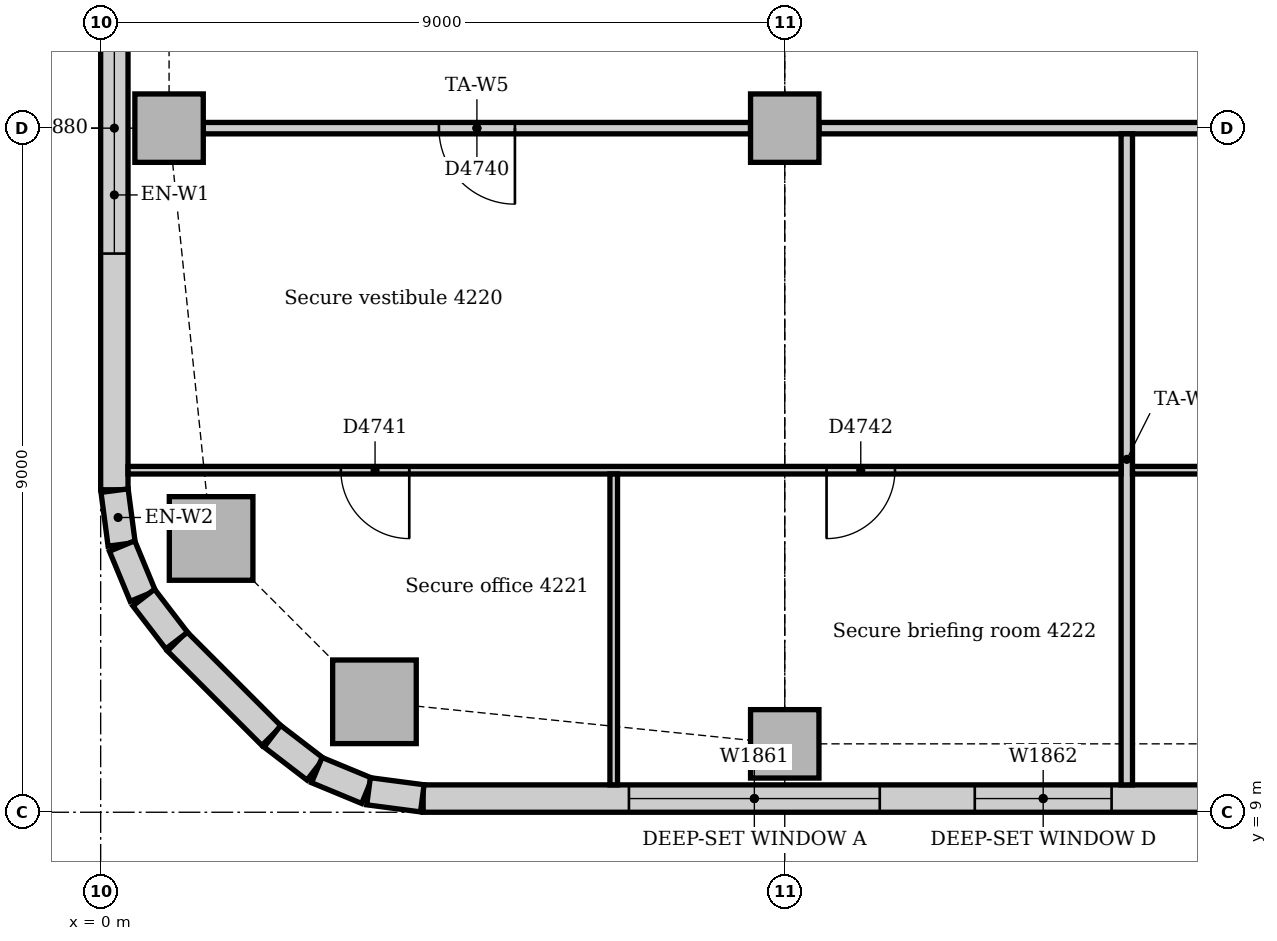
"""IFC4 building model, lengths in metres.
Left out: names, types, materials, properties, quantities, classifications, styles, units other than length and angle.
Written with IfcOpenShell. Run it as: python <this file> out.ifc"""

import sys

from ifc_helpers import new_model, si_unit, direction, frame, frame_2d, origin, origin_2d, place, context, subcontext, project, spatial, rectangle, extrude, element, fill, save


model = new_model("IFC4")
c1 = context("Model", 3, precision=1e-05, world=origin(), true_north=direction((0.0, 1.0)))
c2 = subcontext(c1, "Body", "Model", "MODEL_VIEW")
j1 = project(units=[si_unit("LENGTHUNIT", "METRE"), si_unit("PLANEANGLEUNIT", "RADIAN")], contexts=[c1])
p1 = place(None, origin())
s1 = spatial("IfcSite", under=j1, at=p1, CompositionType="ELEMENT")
p2 = place(p1, origin())
s2 = spatial("IfcBuilding", under=s1, at=p2, CompositionType="ELEMENT")
p3 = place(p2, frame((0.0, 0.0, 177.0)))
s3 = spatial("IfcBuildingStorey", under=s2, at=p3, CompositionType="ELEMENT", Elevation=177.0)
for number, where, z_axis, x_axis in (
    (1, (3.602, 10.453, 0.0), (0.0, 0.0, 1.0), (1.0, 0.0, 0.0)),
    (2, (1.453, 12.602, 0.0), (0.0, 0.0, 1.0), (1.0, 0.0, 0.0)),
):
    element("IfcColumn", number, at=place(p3, frame(where, z_axis=z_axis, x_axis=x_axis)), inside=s3, PredefinedType="COLUMN", context=c2, shape_type="SweptSolid", body=[
        extrude(rectangle(XDim=1.1, YDim=1.1, at=origin_2d()), origin(), (0.0, 0.0, 1.0), 3.85),
    ])
for number, where, z_axis, x_axis in (
    (3, (9.0, 9.9, 0.0), (0.0, 0.0, 1.0), (1.0, 0.0, 0.0)),
    (4, (0.9, 18.0, 0.0), (0.0, 0.0, 1.0), (1.0, 0.0, 0.0)),
    (5, (9.0, 18.0, 0.0), (0.0, 0.0, 1.0), (1.0, 0.0, 0.0)),
):
    element("IfcColumn", number, at=place(p3, frame(where, z_axis=z_axis, x_axis=x_axis)), inside=s3, PredefinedType="COLUMN", context=c2, shape_type="SweptSolid", body=[
        extrude(rectangle(XDim=0.9, YDim=0.9, at=origin_2d()), origin(), (0.0, 0.0, 1.0), 3.85),
    ])
p4 = place(p3, frame((4.243, 9.18, 0.0), z_axis=(0.0, 0.0, 1.0), x_axis=(1.0, 0.0, 0.0)))
e6 = element("IfcWall", 6, at=p4, inside=s3, PredefinedType="STANDARD", context=c2, shape_type="SweptSolid", body=[
    extrude(rectangle(XDim=30.515, YDim=0.36, at=frame_2d((15.257, 0.0))), origin(), (0.0, 0.0, 1.0), 3.85),
])
p5 = place(p4, frame((2.707, 0.0, 0.9)))
e7 = element("IfcOpeningElement", 7, at=p5, cuts=e6, PredefinedType="OPENING", context=c2, shape_type="SweptSolid", body=[
    extrude(rectangle(XDim=3.3, YDim=1.6, at=frame_2d((1.65, 0.8))), frame((0.0, 0.19, 0.0), z_axis=(0.0, -1.0, 0.0), x_axis=(1.0, 0.0, 0.0)), (0.0, 0.0, 1.0), 0.38),
])
p6 = place(p4, frame((7.257, 0.0, 0.9)))
e8 = element("IfcOpeningElement", 8, at=p6, cuts=e6, PredefinedType="OPENING", context=c2, shape_type="SweptSolid", body=[
    extrude(rectangle(XDim=1.8, YDim=1.6, at=frame_2d((0.9, 0.8))), frame((0.0, 0.19, 0.0), z_axis=(0.0, -1.0, 0.0), x_axis=(1.0, 0.0, 0.0)), (0.0, 0.0, 1.0), 0.38),
])
p7 = place(p4, frame((11.357, 0.0, 0.9)))
e9 = element("IfcOpeningElement", 9, at=p7, cuts=e6, PredefinedType="OPENING", context=c2, shape_type="SweptSolid", body=[
    extrude(rectangle(XDim=3.3, YDim=1.6, at=frame_2d((1.65, 0.8))), frame((0.0, 0.19, 0.0), z_axis=(0.0, -1.0, 0.0), x_axis=(1.0, 0.0, 0.0)), (0.0, 0.0, 1.0), 0.38),
])
p8 = place(p4, frame((16.207, 0.0, 0.9)))
e10 = element("IfcOpeningElement", 10, at=p8, cuts=e6, PredefinedType="OPENING", context=c2, shape_type="SweptSolid", body=[
    extrude(rectangle(XDim=3.3, YDim=1.6, at=frame_2d((1.65, 0.8))), frame((0.0, 0.19, 0.0), z_axis=(0.0, -1.0, 0.0), x_axis=(1.0, 0.0, 0.0)), (0.0, 0.0, 1.0), 0.38),
])
p9 = place(p4, frame((20.357, 0.0, 0.9)))
e11 = element("IfcOpeningElement", 11, at=p9, cuts=e6, PredefinedType="OPENING", context=c2, shape_type="SweptSolid", body=[
    extrude(rectangle(XDim=3.3, YDim=1.6, at=frame_2d((1.65, 0.8))), frame((0.0, 0.19, 0.0), z_axis=(0.0, -1.0, 0.0), x_axis=(1.0, 0.0, 0.0)), (0.0, 0.0, 1.0), 0.38),
])
p10 = place(p4, frame((24.857, 0.0, 0.9)))
e12 = element("IfcOpeningElement", 12, at=p10, cuts=e6, PredefinedType="OPENING", context=c2, shape_type="SweptSolid", body=[
    extrude(rectangle(XDim=3.3, YDim=1.6, at=frame_2d((1.65, 0.8))), frame((0.0, 0.19, 0.0), z_axis=(0.0, -1.0, 0.0), x_axis=(1.0, 0.0, 0.0)), (0.0, 0.0, 1.0), 0.38),
])
p11 = place(p3, frame((0.18, 21.0, 0.0), z_axis=(0.0, 0.0, 1.0), x_axis=(0.0, -1.0, 0.0)))
e13 = element("IfcWall", 13, at=p11, inside=s3, PredefinedType="STANDARD", context=c2, shape_type="SweptSolid", body=[
    extrude(rectangle(XDim=7.757, YDim=0.36, at=frame_2d((3.879, 0.0))), origin(), (0.0, 0.0, 1.0), 3.85),
])
p12 = place(p11, frame((1.35, 0.0, 0.9)))
e14 = element("IfcOpeningElement", 14, at=p12, cuts=e13, PredefinedType="OPENING", context=c2, shape_type="SweptSolid", body=[
    extrude(rectangle(XDim=3.3, YDim=1.6, at=frame_2d((1.65, 0.8))), frame((0.0, 0.19, 0.0), z_axis=(0.0, -1.0, 0.0), x_axis=(1.0, 0.0, 0.0)), (0.0, 0.0, 1.0), 0.38),
])
p13 = place(p3, frame((1.006, 11.249, 0.0), z_axis=(0.0, 0.0, 1.0), x_axis=(0.707106781187, -0.707106781187, 0.0)))
e15 = element("IfcWall", 15, at=p13, inside=s3, PredefinedType="STANDARD", context=c2, shape_type="SweptSolid", body=[
    extrude(rectangle(XDim=1.757, YDim=0.36, at=frame_2d((0.879, 0.0))), origin(), (0.0, 0.0, 1.0), 3.85),
])
for number, where, z_axis, x_axis in (
    (16, (0.183, 13.231, 0.0), (0.0, 0.0, 1.0), (0.131, -0.991, 0.0)),
    (17, (0.282, 12.503, 0.0), (0.0, 0.0, 1.0), (0.383, -0.924, 0.0)),
):
    element("IfcWall", number, at=place(p3, frame(where, z_axis=z_axis, x_axis=x_axis)), inside=s3, PredefinedType="STANDARD", context=c2, shape_type="SweptSolid", body=[
        extrude(rectangle(XDim=0.713, YDim=0.36, at=frame_2d((0.356, 0.0))), origin(), (0.0, 0.0, 1.0), 3.85),
    ])
for number, where, z_axis, x_axis in (
    (18, (0.566, 11.825, 0.0), (0.0, 0.0, 1.0), (0.609, -0.793, 0.0)),
    (19, (2.259, 10.0, 0.0), (0.0, 0.0, 1.0), (0.793, -0.609, 0.0)),
):
    element("IfcWall", number, at=place(p3, frame(where, z_axis=z_axis, x_axis=x_axis)), inside=s3, PredefinedType="STANDARD", context=c2, shape_type="SweptSolid", body=[
        extrude(rectangle(XDim=0.713, YDim=0.36, at=frame_2d((0.357, 0.0))), origin(), (0.0, 0.0, 1.0), 3.85),
    ])
for number, where, z_axis, x_axis in (
    (20, (2.844, 9.555, 0.0), (0.0, 0.0, 1.0), (0.924, -0.383, 0.0)),
    (21, (3.524, 9.276, 0.0), (0.0, 0.0, 1.0), (0.991, -0.131, 0.0)),
):
    element("IfcWall", number, at=place(p3, frame(where, z_axis=z_axis, x_axis=x_axis)), inside=s3, PredefinedType="STANDARD", context=c2, shape_type="SweptSolid", body=[
        extrude(rectangle(XDim=0.713, YDim=0.36, at=frame_2d((0.356, 0.0))), origin(), (0.0, 0.0, 1.0), 3.85),
    ])
p14 = place(p3, frame((1.35, 18.0, 0.0), z_axis=(0.0, 0.0, 1.0), x_axis=(1.0, 0.0, 0.0)))
e22 = element("IfcWall", 22, at=p14, inside=s3, PredefinedType="PARTITIONING", context=c2, shape_type="SweptSolid", body=[
    extrude(rectangle(XDim=7.2, YDim=0.15, at=frame_2d((3.6, 0.0))), origin(), (0.0, 0.0, 1.0), 3.262),
])
p15 = place(p14, frame((3.1, 0.0, 0.0)))
e23 = element("IfcOpeningElement", 23, at=p15, cuts=e22, PredefinedType="OPENING", context=c2, shape_type="SweptSolid", body=[
    extrude(rectangle(XDim=1.0, YDim=2.1, at=frame_2d((0.5, 1.05))), frame((0.0, 0.085, 0.0), z_axis=(0.0, -1.0, 0.0), x_axis=(1.0, 0.0, 0.0)), (0.0, 0.0, 1.0), 0.17),
])
p16 = place(p3, frame((9.45, 18.0, 0.0), z_axis=(0.0, 0.0, 1.0), x_axis=(1.0, 0.0, 0.0)))
e24 = element("IfcWall", 24, at=p16, inside=s3, PredefinedType="PARTITIONING", context=c2, shape_type="SweptSolid", body=[
    extrude(rectangle(XDim=8.1, YDim=0.15, at=frame_2d((4.05, 0.0))), origin(), (0.0, 0.0, 1.0), 3.262),
])
p17 = place(p16, frame((5.5, 0.0, 0.0)))
e25 = element("IfcOpeningElement", 25, at=p17, cuts=e24, PredefinedType="OPENING", context=c2, shape_type="SweptSolid", body=[
    extrude(rectangle(XDim=1.0, YDim=2.1, at=frame_2d((0.5, 1.05))), frame((0.0, 0.085, 0.0), z_axis=(0.0, -1.0, 0.0), x_axis=(1.0, 0.0, 0.0)), (0.0, 0.0, 1.0), 0.17),
])
p18 = place(p3, frame((13.5, 9.36, 0.0), z_axis=(0.0, 0.0, 1.0), x_axis=(0.0, 1.0, 0.0)))
e26 = element("IfcWall", 26, at=p18, inside=s3, PredefinedType="PARTITIONING", context=c2, shape_type="SweptSolid", body=[
    extrude(rectangle(XDim=8.565, YDim=0.15, at=frame_2d((4.282, 0.0))), origin(), (0.0, 0.0, 1.0), 3.85),
])
p19 = place(p3, frame((13.575, 13.5, 0.0), z_axis=(0.0, 0.0, 1.0), x_axis=(1.0, 0.0, 0.0)))
e27 = element("IfcWall", 27, at=p19, inside=s3, PredefinedType="PARTITIONING", context=c2, shape_type="SweptSolid", body=[
    extrude(rectangle(XDim=13.35, YDim=0.1, at=frame_2d((6.675, 0.0))), origin(), (0.0, 0.0, 1.0), 3.4),
])
p20 = place(p19, frame((2.95, 0.0, 0.0)))
e28 = element("IfcOpeningElement", 28, at=p20, cuts=e27, PredefinedType="OPENING", context=c2, shape_type="SweptSolid", body=[
    extrude(rectangle(XDim=0.9, YDim=2.1, at=frame_2d((0.45, 1.05))), frame((0.0, 0.06, 0.0), z_axis=(0.0, -1.0, 0.0), x_axis=(1.0, 0.0, 0.0)), (0.0, 0.0, 1.0), 0.12),
])
p21 = place(p19, frame((9.475, 0.0, 0.0)))
e29 = element("IfcOpeningElement", 29, at=p21, cuts=e27, PredefinedType="OPENING", context=c2, shape_type="SweptSolid", body=[
    extrude(rectangle(XDim=0.9, YDim=2.1, at=frame_2d((0.45, 1.05))), frame((0.0, 0.06, 0.0), z_axis=(0.0, -1.0, 0.0), x_axis=(1.0, 0.0, 0.0)), (0.0, 0.0, 1.0), 0.12),
])
p22 = place(p3, frame((0.36, 13.5, 0.0), z_axis=(0.0, 0.0, 1.0), x_axis=(1.0, 0.0, 0.0)))
e30 = element("IfcWall", 30, at=p22, inside=s3, PredefinedType="PARTITIONING", context=c2, shape_type="SweptSolid", body=[
    extrude(rectangle(XDim=13.065, YDim=0.1, at=frame_2d((6.532, 0.0))), origin(), (0.0, 0.0, 1.0), 3.4),
])
p23 = place(p22, frame((2.8, 0.0, 0.0)))
e31 = element("IfcOpeningElement", 31, at=p23, cuts=e30, PredefinedType="OPENING", context=c2, shape_type="SweptSolid", body=[
    extrude(rectangle(XDim=0.9, YDim=2.1, at=frame_2d((0.45, 1.05))), frame((0.0, 0.06, 0.0), z_axis=(0.0, -1.0, 0.0), x_axis=(1.0, 0.0, 0.0)), (0.0, 0.0, 1.0), 0.12),
])
p24 = place(p22, frame((9.19, 0.0, 0.0)))
e32 = element("IfcOpeningElement", 32, at=p24, cuts=e30, PredefinedType="OPENING", context=c2, shape_type="SweptSolid", body=[
    extrude(rectangle(XDim=0.9, YDim=2.1, at=frame_2d((0.45, 1.05))), frame((0.0, 0.06, 0.0), z_axis=(0.0, -1.0, 0.0), x_axis=(1.0, 0.0, 0.0)), (0.0, 0.0, 1.0), 0.12),
])
p25 = place(p3, frame((6.75, 9.36, 0.0), z_axis=(0.0, 0.0, 1.0), x_axis=(0.0, 1.0, 0.0)))
e33 = element("IfcWall", 33, at=p25, inside=s3, PredefinedType="PARTITIONING", context=c2, shape_type="SweptSolid", body=[
    extrude(rectangle(XDim=4.09, YDim=0.1, at=frame_2d((2.045, 0.0))), origin(), (0.0, 0.0, 1.0), 3.85),
])
p26 = place(p5, origin())
e34 = element("IfcWindow", 34, at=p26, inside=s3, PartitioningType="SINGLE_PANEL", PredefinedType="WINDOW", context=c2, shape_type="SweptSolid", body=[
    extrude(rectangle(XDim=3.3, YDim=1.6, at=frame_2d((1.65, 0.8))), frame((0.0, 0.13, 0.0), z_axis=(0.0, -1.0, 0.0), x_axis=(1.0, 0.0, 0.0)), (0.0, 0.0, 1.0), 0.06),
])
fill(e7, e34)
p27 = place(p6, origin())
e35 = element("IfcWindow", 35, at=p27, inside=s3, PartitioningType="SINGLE_PANEL", PredefinedType="WINDOW", context=c2, shape_type="SweptSolid", body=[
    extrude(rectangle(XDim=1.8, YDim=1.6, at=frame_2d((0.9, 0.8))), frame((0.0, 0.13, 0.0), z_axis=(0.0, -1.0, 0.0), x_axis=(1.0, 0.0, 0.0)), (0.0, 0.0, 1.0), 0.06),
])
fill(e8, e35)
p28 = place(p12, origin())
e36 = element("IfcWindow", 36, at=p28, inside=s3, PartitioningType="SINGLE_PANEL", PredefinedType="WINDOW", context=c2, shape_type="SweptSolid", body=[
    extrude(rectangle(XDim=3.3, YDim=1.6, at=frame_2d((1.65, 0.8))), frame((0.0, 0.13, 0.0), z_axis=(0.0, -1.0, 0.0), x_axis=(1.0, 0.0, 0.0)), (0.0, 0.0, 1.0), 0.06),
])
fill(e14, e36)
p29 = place(p15, frame((1.0, 0.0, 0.0), z_axis=(0.0, 0.0, 1.0), x_axis=(-1.0, 0.0, 0.0)))
e37 = element("IfcDoor", 37, at=p29, inside=s3, OperationType="SINGLE_SWING_LEFT", PredefinedType="DOOR", context=c2, shape_type="SweptSolid", body=[
    extrude(rectangle(XDim=1.0, YDim=2.1, at=frame_2d((0.5, 1.05))), frame((0.0, 0.025, 0.0), z_axis=(0.0, -1.0, 0.0), x_axis=(1.0, 0.0, 0.0)), (0.0, 0.0, 1.0), 0.05),
])
fill(e23, e37)
p30 = place(p23, frame((0.9, 0.0, 0.0), z_axis=(0.0, 0.0, 1.0), x_axis=(-1.0, 0.0, 0.0)))
e38 = element("IfcDoor", 38, at=p30, inside=s3, OperationType="SINGLE_SWING_LEFT", PredefinedType="DOOR", context=c2, shape_type="SweptSolid", body=[
    extrude(rectangle(XDim=0.9, YDim=2.1, at=frame_2d((0.45, 1.05))), frame((0.0, 0.025, 0.0), z_axis=(0.0, -1.0, 0.0), x_axis=(1.0, 0.0, 0.0)), (0.0, 0.0, 1.0), 0.05),
])
fill(e31, e38)
p31 = place(p24, frame((0.9, 0.0, 0.0), z_axis=(0.0, 0.0, 1.0), x_axis=(-1.0, 0.0, 0.0)))
e39 = element("IfcDoor", 39, at=p31, inside=s3, OperationType="SINGLE_SWING_RIGHT", PredefinedType="DOOR", context=c2, shape_type="SweptSolid", body=[
    extrude(rectangle(XDim=0.9, YDim=2.1, at=frame_2d((0.45, 1.05))), frame((0.0, 0.025, 0.0), z_axis=(0.0, -1.0, 0.0), x_axis=(1.0, 0.0, 0.0)), (0.0, 0.0, 1.0), 0.05),
])
fill(e32, e39)
save(model, sys.argv[1])
